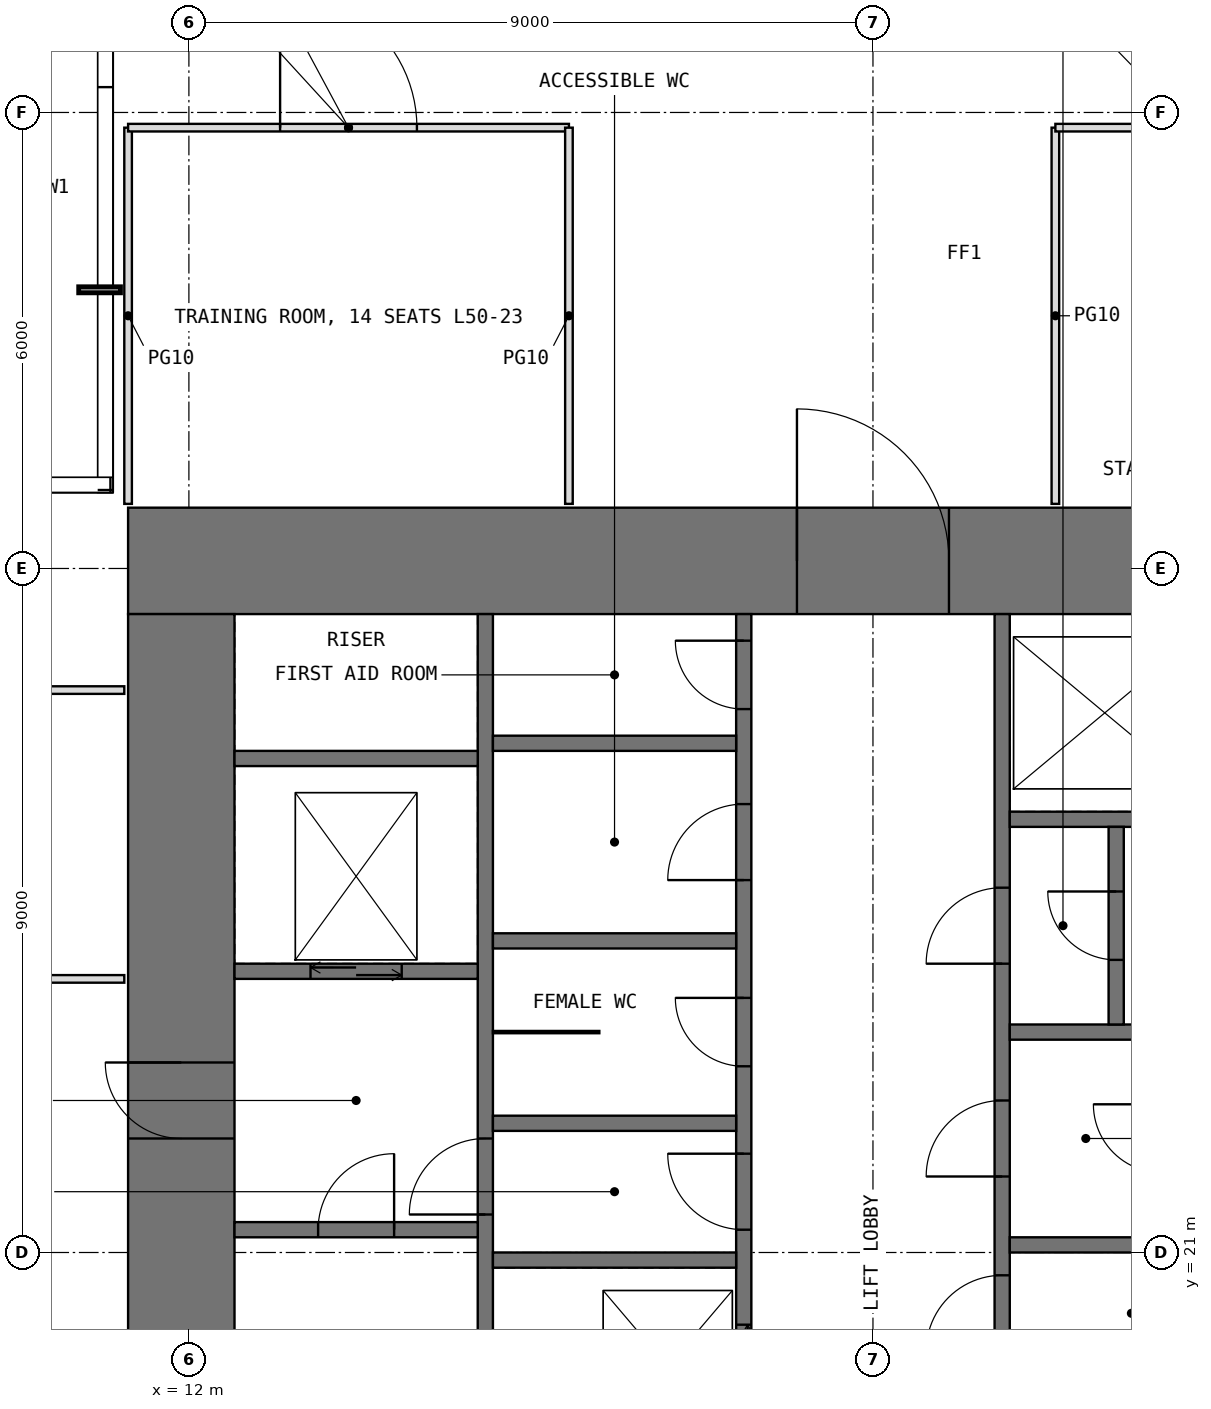
"""IFC4 building model, lengths in metres.
Left out: names, types, materials, properties, quantities, classifications, styles, units other than length and angle.
Written with IfcOpenShell. Run it as: python <this file> out.ifc"""

import sys

from ifc_helpers import new_model, si_unit, direction, frame, frame_2d, origin, place, context, subcontext, project, spatial, rectangle, extrude, element, fill, save


model = new_model("IFC4")
c1 = context("Model", 3, precision=1e-05, world=origin(), true_north=direction((0.0, 1.0)))
c2 = subcontext(c1, "Body", "Model", "MODEL_VIEW")
j1 = project(units=[si_unit("LENGTHUNIT", "METRE"), si_unit("PLANEANGLEUNIT", "RADIAN")], contexts=[c1])
p1 = place(None, origin())
s1 = spatial("IfcSite", under=j1, at=p1, CompositionType="ELEMENT")
p2 = place(p1, origin())
s2 = spatial("IfcBuilding", under=s1, at=p2, CompositionType="ELEMENT")
p3 = place(p2, frame((0.0, 0.0, 210.5)))
s3 = spatial("IfcBuildingStorey", under=s2, at=p3, CompositionType="ELEMENT", Elevation=210.5)
p4 = place(p3, frame((11.2, 30.1, -0.05), z_axis=(0.0, 0.0, 1.0), x_axis=(1.0, 0.0, 0.0)))
e1 = element("IfcWall", 1, at=p4, inside=s3, PredefinedType="SHEAR", context=c2, shape_type="SweptSolid", body=[
    extrude(rectangle(XDim=19.6, YDim=1.4, at=frame_2d((9.8, 0.0))), origin(), (0.0, 0.0, 1.0), 4.0),
])
p5 = place(p4, frame((8.8, 0.0, 0.05)))
e2 = element("IfcOpeningElement", 2, at=p5, cuts=e1, PredefinedType="OPENING", context=c2, shape_type="SweptSolid", body=[
    extrude(rectangle(XDim=2.0, YDim=2.2, at=frame_2d((1.0, 1.1))), frame((0.0, 0.71, 0.0), z_axis=(0.0, -1.0, 0.0), x_axis=(1.0, 0.0, 0.0)), (0.0, 0.0, 1.0), 1.42),
])
p6 = place(p3, frame((11.9, 12.6, -0.05), z_axis=(0.0, 0.0, 1.0), x_axis=(0.0, 1.0, 0.0)))
e3 = element("IfcWall", 3, at=p6, inside=s3, PredefinedType="SHEAR", context=c2, shape_type="SweptSolid", body=[
    extrude(rectangle(XDim=16.8, YDim=1.4, at=frame_2d((8.4, 0.0))), origin(), (0.0, 0.0, 1.0), 4.0),
])
p7 = place(p6, frame((9.9, 0.0, 0.05)))
e4 = element("IfcOpeningElement", 4, at=p7, cuts=e3, PredefinedType="OPENING", context=c2, shape_type="SweptSolid", body=[
    extrude(rectangle(XDim=1.0, YDim=2.2, at=frame_2d((0.5, 1.1))), frame((0.0, 0.71, 0.0), z_axis=(0.0, -1.0, 0.0), x_axis=(1.0, 0.0, 0.0)), (0.0, 0.0, 1.0), 1.42),
])
p8 = place(p3, frame((15.9, 12.6, -0.05), z_axis=(0.0, 0.0, 1.0), x_axis=(0.0, 1.0, 0.0)))
e5 = element("IfcWall", 5, at=p8, inside=s3, PredefinedType="SHEAR", context=c2, shape_type="SweptSolid", body=[
    extrude(rectangle(XDim=16.8, YDim=0.2, at=frame_2d((8.4, 0.0))), origin(), (0.0, 0.0, 1.0), 4.0),
])
p9 = place(p8, frame((8.9, 0.0, 0.05)))
e6 = element("IfcOpeningElement", 6, at=p9, cuts=e5, PredefinedType="OPENING", context=c2, shape_type="SweptSolid", body=[
    extrude(rectangle(XDim=1.0, YDim=2.2, at=frame_2d((0.5, 1.1))), frame((0.0, 0.11, 0.0), z_axis=(0.0, -1.0, 0.0), x_axis=(1.0, 0.0, 0.0)), (0.0, 0.0, 1.0), 0.22),
])
p10 = place(p3, frame((19.3, 12.6, -0.05), z_axis=(0.0, 0.0, 1.0), x_axis=(0.0, 1.0, 0.0)))
e7 = element("IfcWall", 7, at=p10, inside=s3, PredefinedType="SHEAR", context=c2, shape_type="SweptSolid", body=[
    extrude(rectangle(XDim=16.8, YDim=0.2, at=frame_2d((8.4, 0.0))), origin(), (0.0, 0.0, 1.0), 4.0),
])
p11 = place(p10, frame((8.7, 0.0, 0.05)))
e8 = element("IfcOpeningElement", 8, at=p11, cuts=e7, PredefinedType="OPENING", context=c2, shape_type="SweptSolid", body=[
    extrude(rectangle(XDim=1.0, YDim=2.2, at=frame_2d((0.5, 1.1))), frame((0.0, 0.11, 0.0), z_axis=(0.0, -1.0, 0.0), x_axis=(1.0, 0.0, 0.0)), (0.0, 0.0, 1.0), 0.22),
])
p12 = place(p10, frame((10.85, 0.0, 0.05)))
e9 = element("IfcOpeningElement", 9, at=p12, cuts=e7, PredefinedType="OPENING", context=c2, shape_type="SweptSolid", body=[
    extrude(rectangle(XDim=0.9, YDim=2.2, at=frame_2d((0.45, 1.1))), frame((0.0, 0.11, 0.0), z_axis=(0.0, -1.0, 0.0), x_axis=(1.0, 0.0, 0.0)), (0.0, 0.0, 1.0), 0.22),
])
p13 = place(p10, frame((13.3, 0.0, 0.05)))
e10 = element("IfcOpeningElement", 10, at=p13, cuts=e7, PredefinedType="OPENING", context=c2, shape_type="SweptSolid", body=[
    extrude(rectangle(XDim=1.0, YDim=2.2, at=frame_2d((0.5, 1.1))), frame((0.0, 0.11, 0.0), z_axis=(0.0, -1.0, 0.0), x_axis=(1.0, 0.0, 0.0)), (0.0, 0.0, 1.0), 0.22),
])
p14 = place(p10, frame((15.55, 0.0, 0.05)))
e11 = element("IfcOpeningElement", 11, at=p14, cuts=e7, PredefinedType="OPENING", context=c2, shape_type="SweptSolid", body=[
    extrude(rectangle(XDim=0.9, YDim=2.2, at=frame_2d((0.45, 1.1))), frame((0.0, 0.11, 0.0), z_axis=(0.0, -1.0, 0.0), x_axis=(1.0, 0.0, 0.0)), (0.0, 0.0, 1.0), 0.22),
])
p15 = place(p10, frame((0.75, 0.0, 0.05)))
e12 = element("IfcOpeningElement", 12, at=p15, cuts=e7, PredefinedType="OPENING", context=c2, shape_type="SweptSolid", body=[
    extrude(rectangle(XDim=1.1, YDim=2.2, at=frame_2d((0.55, 1.1))), frame((0.0, 0.11, 0.0), z_axis=(0.0, -1.0, 0.0), x_axis=(1.0, 0.0, 0.0)), (0.0, 0.0, 1.0), 0.22),
])
p16 = place(p10, frame((3.55, 0.0, 0.05)))
e13 = element("IfcOpeningElement", 13, at=p16, cuts=e7, PredefinedType="OPENING", context=c2, shape_type="SweptSolid", body=[
    extrude(rectangle(XDim=1.1, YDim=2.2, at=frame_2d((0.55, 1.1))), frame((0.0, 0.11, 0.0), z_axis=(0.0, -1.0, 0.0), x_axis=(1.0, 0.0, 0.0)), (0.0, 0.0, 1.0), 0.22),
])
p17 = place(p10, frame((6.35, 0.0, 0.05)))
e14 = element("IfcOpeningElement", 14, at=p17, cuts=e7, PredefinedType="OPENING", context=c2, shape_type="SweptSolid", body=[
    extrude(rectangle(XDim=1.1, YDim=2.2, at=frame_2d((0.55, 1.1))), frame((0.0, 0.11, 0.0), z_axis=(0.0, -1.0, 0.0), x_axis=(1.0, 0.0, 0.0)), (0.0, 0.0, 1.0), 0.22),
])
p18 = place(p3, frame((22.7, 12.6, -0.05), z_axis=(0.0, 0.0, 1.0), x_axis=(0.0, 1.0, 0.0)))
e15 = element("IfcWall", 15, at=p18, inside=s3, PredefinedType="SHEAR", context=c2, shape_type="SweptSolid", body=[
    extrude(rectangle(XDim=16.8, YDim=0.2, at=frame_2d((8.4, 0.0))), origin(), (0.0, 0.0, 1.0), 4.0),
])
p19 = place(p18, frame((0.45, 0.0, 0.05)))
e16 = element("IfcOpeningElement", 16, at=p19, cuts=e15, PredefinedType="OPENING", context=c2, shape_type="SweptSolid", body=[
    extrude(rectangle(XDim=0.9, YDim=2.2, at=frame_2d((0.45, 1.1))), frame((0.0, 0.11, 0.0), z_axis=(0.0, -1.0, 0.0), x_axis=(1.0, 0.0, 0.0)), (0.0, 0.0, 1.0), 0.22),
])
p20 = place(p18, frame((7.1, 0.0, 0.05)))
e17 = element("IfcOpeningElement", 17, at=p20, cuts=e15, PredefinedType="OPENING", context=c2, shape_type="SweptSolid", body=[
    extrude(rectangle(XDim=1.0, YDim=2.2, at=frame_2d((0.5, 1.1))), frame((0.0, 0.11, 0.0), z_axis=(0.0, -1.0, 0.0), x_axis=(1.0, 0.0, 0.0)), (0.0, 0.0, 1.0), 0.22),
])
p21 = place(p18, frame((1.95, 0.0, 0.05)))
e18 = element("IfcOpeningElement", 18, at=p21, cuts=e15, PredefinedType="OPENING", context=c2, shape_type="SweptSolid", body=[
    extrude(rectangle(XDim=0.9, YDim=2.2, at=frame_2d((0.45, 1.1))), frame((0.0, 0.11, 0.0), z_axis=(0.0, -1.0, 0.0), x_axis=(1.0, 0.0, 0.0)), (0.0, 0.0, 1.0), 0.22),
])
p22 = place(p18, frame((4.95, 0.0, 0.05)))
e19 = element("IfcOpeningElement", 19, at=p22, cuts=e15, PredefinedType="OPENING", context=c2, shape_type="SweptSolid", body=[
    extrude(rectangle(XDim=0.9, YDim=2.2, at=frame_2d((0.45, 1.1))), frame((0.0, 0.11, 0.0), z_axis=(0.0, -1.0, 0.0), x_axis=(1.0, 0.0, 0.0)), (0.0, 0.0, 1.0), 0.22),
])
p23 = place(p18, frame((9.4, 0.0, 0.05)))
e20 = element("IfcOpeningElement", 20, at=p23, cuts=e15, PredefinedType="OPENING", context=c2, shape_type="SweptSolid", body=[
    extrude(rectangle(XDim=1.0, YDim=2.2, at=frame_2d((0.5, 1.1))), frame((0.0, 0.11, 0.0), z_axis=(0.0, -1.0, 0.0), x_axis=(1.0, 0.0, 0.0)), (0.0, 0.0, 1.0), 0.22),
])
p24 = place(p18, frame((12.2, 0.0, 0.05)))
e21 = element("IfcOpeningElement", 21, at=p24, cuts=e15, PredefinedType="OPENING", context=c2, shape_type="SweptSolid", body=[
    extrude(rectangle(XDim=1.0, YDim=2.2, at=frame_2d((0.5, 1.1))), frame((0.0, 0.11, 0.0), z_axis=(0.0, -1.0, 0.0), x_axis=(1.0, 0.0, 0.0)), (0.0, 0.0, 1.0), 0.22),
])
p25 = place(p3, frame((12.6, 21.3, -0.05), z_axis=(0.0, 0.0, 1.0), x_axis=(1.0, 0.0, 0.0)))
e22 = element("IfcWall", 22, at=p25, inside=s3, PredefinedType="SHEAR", context=c2, shape_type="SweptSolid", body=[
    extrude(rectangle(XDim=3.2, YDim=0.2, at=frame_2d((1.6, 0.0))), origin(), (0.0, 0.0, 1.0), 4.0),
])
p26 = place(p25, frame((1.1, 0.0, 0.05)))
e23 = element("IfcOpeningElement", 23, at=p26, cuts=e22, PredefinedType="OPENING", context=c2, shape_type="SweptSolid", body=[
    extrude(rectangle(XDim=1.0, YDim=2.2, at=frame_2d((0.5, 1.1))), frame((0.0, 0.11, 0.0), z_axis=(0.0, -1.0, 0.0), x_axis=(1.0, 0.0, 0.0)), (0.0, 0.0, 1.0), 0.22),
])
p27 = place(p3, frame((12.6, 24.7, -0.05), z_axis=(0.0, 0.0, 1.0), x_axis=(1.0, 0.0, 0.0)))
e24 = element("IfcWall", 24, at=p27, inside=s3, PredefinedType="SHEAR", context=c2, shape_type="SweptSolid", body=[
    extrude(rectangle(XDim=3.2, YDim=0.2, at=frame_2d((1.6, 0.0))), origin(), (0.0, 0.0, 1.0), 4.0),
])
p28 = place(p27, frame((1.0, 0.0, 0.05)))
e25 = element("IfcOpeningElement", 25, at=p28, cuts=e24, PredefinedType="OPENING", context=c2, shape_type="SweptSolid", body=[
    extrude(rectangle(XDim=1.2, YDim=2.2, at=frame_2d((0.6, 1.1))), frame((0.0, 0.11, 0.0), z_axis=(0.0, -1.0, 0.0), x_axis=(1.0, 0.0, 0.0)), (0.0, 0.0, 1.0), 0.22),
])
for number, where, z_axis, x_axis in (
    (26, (12.6, 27.5, -0.05), (0.0, 0.0, 1.0), (1.0, 0.0, 0.0)),
    (27, (16.0, 20.9, -0.05), (0.0, 0.0, 1.0), (1.0, 0.0, 0.0)),
    (28, (16.0, 22.7, -0.05), (0.0, 0.0, 1.0), (1.0, 0.0, 0.0)),
    (29, (16.0, 25.1, -0.05), (0.0, 0.0, 1.0), (1.0, 0.0, 0.0)),
    (30, (16.0, 27.7, -0.05), (0.0, 0.0, 1.0), (1.0, 0.0, 0.0)),
    (31, (22.8, 21.1, -0.05), (0.0, 0.0, 1.0), (1.0, 0.0, 0.0)),
    (32, (22.8, 23.9, -0.05), (0.0, 0.0, 1.0), (1.0, 0.0, 0.0)),
    (33, (22.8, 26.7, -0.05), (0.0, 0.0, 1.0), (1.0, 0.0, 0.0)),
):
    element("IfcWall", number, at=place(p3, frame(where, z_axis=z_axis, x_axis=x_axis)), inside=s3, PredefinedType="SHEAR", context=c2, shape_type="SweptSolid", body=[
        extrude(rectangle(XDim=3.2, YDim=0.2, at=frame_2d((1.6, 0.0))), origin(), (0.0, 0.0, 1.0), 4.0),
    ])
p29 = place(p3, frame((16.0, 23.9, 0.0), z_axis=(0.0, 0.0, 1.0), x_axis=(1.0, 0.0, 0.0)))
e34 = element("IfcWall", 34, at=p29, inside=s3, PredefinedType="PARTITIONING", context=c2, shape_type="SweptSolid", body=[
    extrude(rectangle(XDim=1.4, YDim=0.03, at=frame_2d((0.7, 0.0))), origin(), (0.0, 0.0, 1.0), 3.75),
])
p30 = place(p3, frame((24.2, 24.0, -0.05), z_axis=(0.0, 0.0, 1.0), x_axis=(0.0, 1.0, 0.0)))
e35 = element("IfcWall", 35, at=p30, inside=s3, PredefinedType="SHEAR", context=c2, shape_type="SweptSolid", body=[
    extrude(rectangle(XDim=2.6, YDim=0.2, at=frame_2d((1.3, 0.0))), origin(), (0.0, 0.0, 1.0), 4.0),
])
p31 = place(p30, frame((0.85, 0.0, 0.05)))
e36 = element("IfcOpeningElement", 36, at=p31, cuts=e35, PredefinedType="OPENING", context=c2, shape_type="SweptSolid", body=[
    extrude(rectangle(XDim=0.9, YDim=2.2, at=frame_2d((0.45, 1.1))), frame((0.0, 0.11, 0.0), z_axis=(0.0, -1.0, 0.0), x_axis=(1.0, 0.0, 0.0)), (0.0, 0.0, 1.0), 0.22),
])
for number, where, z_axis, x_axis in (
    (37, (8.0, 24.6, 0.0), (0.0, 0.0, 1.0), (1.0, 0.0, 0.0)),
    (38, (8.0, 28.4, 0.0), (0.0, 0.0, 1.0), (1.0, 0.0, 0.0)),
):
    element("IfcWall", number, at=place(p3, frame(where, z_axis=z_axis, x_axis=x_axis)), inside=s3, PredefinedType="PARTITIONING", context=c2, shape_type="SweptSolid", body=[
        extrude(rectangle(XDim=3.15, YDim=0.1, at=frame_2d((1.575, 0.0))), origin(), (0.0, 0.0, 1.0), 3.75),
    ])
p32 = place(p3, frame((11.2, 30.85, 0.0), z_axis=(0.0, 0.0, 1.0), x_axis=(0.0, 1.0, 0.0)))
e39 = element("IfcWall", 39, at=p32, inside=s3, PredefinedType="PARTITIONING", context=c2, shape_type="SweptSolid", body=[
    extrude(rectangle(XDim=4.95, YDim=0.1, at=frame_2d((2.475, 0.0))), origin(), (0.0, 0.0, 1.0), 3.75),
])
p33 = place(p3, frame((11.2, 35.8, 0.0), z_axis=(0.0, 0.0, 1.0), x_axis=(1.0, 0.0, 0.0)))
e40 = element("IfcWall", 40, at=p33, inside=s3, PredefinedType="PARTITIONING", context=c2, shape_type="SweptSolid", body=[
    extrude(rectangle(XDim=5.8, YDim=0.1, at=frame_2d((2.9, 0.0))), origin(), (0.0, 0.0, 1.0), 3.75),
])
p34 = place(p33, frame((2.0, 0.0, 0.0)))
e41 = element("IfcOpeningElement", 41, at=p34, cuts=e40, PredefinedType="OPENING", context=c2, shape_type="SweptSolid", body=[
    extrude(rectangle(XDim=1.8, YDim=2.4, at=frame_2d((0.9, 1.2))), frame((0.0, 0.06, 0.0), z_axis=(0.0, -1.0, 0.0), x_axis=(1.0, 0.0, 0.0)), (0.0, 0.0, 1.0), 0.12),
])
for number, where, z_axis, x_axis in (
    (42, (17.0, 30.85, 0.0), (0.0, 0.0, 1.0), (0.0, 1.0, 0.0)),
    (43, (23.4, 30.85, 0.0), (0.0, 0.0, 1.0), (0.0, 1.0, 0.0)),
):
    element("IfcWall", number, at=place(p3, frame(where, z_axis=z_axis, x_axis=x_axis)), inside=s3, PredefinedType="PARTITIONING", context=c2, shape_type="SweptSolid", body=[
        extrude(rectangle(XDim=4.95, YDim=0.1, at=frame_2d((2.475, 0.0))), origin(), (0.0, 0.0, 1.0), 3.75),
    ])
p35 = place(p3, frame((23.4, 35.8, 0.0), z_axis=(0.0, 0.0, 1.0), x_axis=(1.0, 0.0, 0.0)))
e44 = element("IfcWall", 44, at=p35, inside=s3, PredefinedType="PARTITIONING", context=c2, shape_type="SweptSolid", body=[
    extrude(rectangle(XDim=3.6, YDim=0.1, at=frame_2d((1.8, 0.0))), origin(), (0.0, 0.0, 1.0), 3.75),
])
p36 = place(p35, frame((1.3, 0.0, 0.0)))
e45 = element("IfcOpeningElement", 45, at=p36, cuts=e44, PredefinedType="OPENING", context=c2, shape_type="SweptSolid", body=[
    extrude(rectangle(XDim=1.0, YDim=2.4, at=frame_2d((0.5, 1.2))), frame((0.0, 0.06, 0.0), z_axis=(0.0, -1.0, 0.0), x_axis=(1.0, 0.0, 0.0)), (0.0, 0.0, 1.0), 0.12),
])
p37 = place(p5, origin())
e46 = element("IfcDoor", 46, at=p37, inside=s3, OperationType="DOUBLE_DOOR_SINGLE_SWING", PredefinedType="DOOR", context=c2, shape_type="SweptSolid", body=[
    extrude(rectangle(XDim=2.0, YDim=2.2, at=frame_2d((1.0, 1.1))), frame((0.0, 0.025, 0.0), z_axis=(0.0, -1.0, 0.0), x_axis=(1.0, 0.0, 0.0)), (0.0, 0.0, 1.0), 0.05),
])
fill(e2, e46)
p38 = place(p7, origin())
e47 = element("IfcDoor", 47, at=p38, inside=s3, OperationType="SINGLE_SWING_RIGHT", PredefinedType="DOOR", context=c2, shape_type="SweptSolid", body=[
    extrude(rectangle(XDim=1.0, YDim=2.2, at=frame_2d((0.5, 1.1))), frame((0.0, 0.025, 0.0), z_axis=(0.0, -1.0, 0.0), x_axis=(1.0, 0.0, 0.0)), (0.0, 0.0, 1.0), 0.05),
])
fill(e4, e47)
p39 = place(p26, origin())
e48 = element("IfcDoor", 48, at=p39, inside=s3, OperationType="SINGLE_SWING_RIGHT", PredefinedType="DOOR", context=c2, shape_type="SweptSolid", body=[
    extrude(rectangle(XDim=1.0, YDim=2.2, at=frame_2d((0.5, 1.1))), frame((0.0, 0.025, 0.0), z_axis=(0.0, -1.0, 0.0), x_axis=(1.0, 0.0, 0.0)), (0.0, 0.0, 1.0), 0.05),
])
fill(e23, e48)
p40 = place(p9, origin())
e49 = element("IfcDoor", 49, at=p40, inside=s3, OperationType="SINGLE_SWING_LEFT", PredefinedType="DOOR", context=c2, shape_type="SweptSolid", body=[
    extrude(rectangle(XDim=1.0, YDim=2.2, at=frame_2d((0.5, 1.1))), frame((0.0, 0.025, 0.0), z_axis=(0.0, -1.0, 0.0), x_axis=(1.0, 0.0, 0.0)), (0.0, 0.0, 1.0), 0.05),
])
fill(e6, e49)
p41 = place(p11, origin())
e50 = element("IfcDoor", 50, at=p41, inside=s3, OperationType="SINGLE_SWING_RIGHT", PredefinedType="DOOR", context=c2, shape_type="SweptSolid", body=[
    extrude(rectangle(XDim=1.0, YDim=2.2, at=frame_2d((0.5, 1.1))), frame((0.0, 0.025, 0.0), z_axis=(0.0, -1.0, 0.0), x_axis=(1.0, 0.0, 0.0)), (0.0, 0.0, 1.0), 0.05),
])
fill(e8, e50)
p42 = place(p20, origin())
e51 = element("IfcDoor", 51, at=p42, inside=s3, OperationType="SINGLE_SWING_LEFT", PredefinedType="DOOR", context=c2, shape_type="SweptSolid", body=[
    extrude(rectangle(XDim=1.0, YDim=2.2, at=frame_2d((0.5, 1.1))), frame((0.0, 0.025, 0.0), z_axis=(0.0, -1.0, 0.0), x_axis=(1.0, 0.0, 0.0)), (0.0, 0.0, 1.0), 0.05),
])
fill(e17, e51)
p43 = place(p12, origin())
e52 = element("IfcDoor", 52, at=p43, inside=s3, OperationType="SINGLE_SWING_RIGHT", PredefinedType="DOOR", context=c2, shape_type="SweptSolid", body=[
    extrude(rectangle(XDim=0.9, YDim=2.2, at=frame_2d((0.45, 1.1))), frame((0.0, 0.025, 0.0), z_axis=(0.0, -1.0, 0.0), x_axis=(1.0, 0.0, 0.0)), (0.0, 0.0, 1.0), 0.05),
])
fill(e9, e52)
p44 = place(p13, origin())
e53 = element("IfcDoor", 53, at=p44, inside=s3, OperationType="SINGLE_SWING_LEFT", PredefinedType="DOOR", context=c2, shape_type="SweptSolid", body=[
    extrude(rectangle(XDim=1.0, YDim=2.2, at=frame_2d((0.5, 1.1))), frame((0.0, 0.025, 0.0), z_axis=(0.0, -1.0, 0.0), x_axis=(1.0, 0.0, 0.0)), (0.0, 0.0, 1.0), 0.05),
])
fill(e10, e53)
p45 = place(p14, origin())
e54 = element("IfcDoor", 54, at=p45, inside=s3, OperationType="SINGLE_SWING_RIGHT", PredefinedType="DOOR", context=c2, shape_type="SweptSolid", body=[
    extrude(rectangle(XDim=0.9, YDim=2.2, at=frame_2d((0.45, 1.1))), frame((0.0, 0.025, 0.0), z_axis=(0.0, -1.0, 0.0), x_axis=(1.0, 0.0, 0.0)), (0.0, 0.0, 1.0), 0.05),
])
fill(e11, e54)
p46 = place(p23, origin())
e55 = element("IfcDoor", 55, at=p46, inside=s3, OperationType="SINGLE_SWING_LEFT", PredefinedType="DOOR", context=c2, shape_type="SweptSolid", body=[
    extrude(rectangle(XDim=1.0, YDim=2.2, at=frame_2d((0.5, 1.1))), frame((0.0, 0.025, 0.0), z_axis=(0.0, -1.0, 0.0), x_axis=(1.0, 0.0, 0.0)), (0.0, 0.0, 1.0), 0.05),
])
fill(e20, e55)
p47 = place(p24, origin())
e56 = element("IfcDoor", 56, at=p47, inside=s3, OperationType="SINGLE_SWING_LEFT", PredefinedType="DOOR", context=c2, shape_type="SweptSolid", body=[
    extrude(rectangle(XDim=1.0, YDim=2.2, at=frame_2d((0.5, 1.1))), frame((0.0, 0.025, 0.0), z_axis=(0.0, -1.0, 0.0), x_axis=(1.0, 0.0, 0.0)), (0.0, 0.0, 1.0), 0.05),
])
fill(e21, e56)
p48 = place(p31, origin())
e57 = element("IfcDoor", 57, at=p48, inside=s3, OperationType="SINGLE_SWING_RIGHT", PredefinedType="DOOR", context=c2, shape_type="SweptSolid", body=[
    extrude(rectangle(XDim=0.9, YDim=2.2, at=frame_2d((0.45, 1.1))), frame((0.0, 0.025, 0.0), z_axis=(0.0, -1.0, 0.0), x_axis=(1.0, 0.0, 0.0)), (0.0, 0.0, 1.0), 0.05),
])
fill(e36, e57)
p49 = place(p34, origin())
e58 = element("IfcDoor", 58, at=p49, inside=s3, OperationType="DOUBLE_DOOR_SINGLE_SWING", PredefinedType="DOOR", context=c2, shape_type="SweptSolid", body=[
    extrude(rectangle(XDim=1.8, YDim=2.4, at=frame_2d((0.9, 1.2))), frame((0.0, 0.025, 0.0), z_axis=(0.0, -1.0, 0.0), x_axis=(1.0, 0.0, 0.0)), (0.0, 0.0, 1.0), 0.05),
])
fill(e41, e58)
p50 = place(p17, origin())
e59 = element("IfcDoor", 59, at=p50, inside=s3, OperationType="DOUBLE_DOOR_SLIDING", PredefinedType="DOOR", context=c2, shape_type="SweptSolid", body=[
    extrude(rectangle(XDim=1.1, YDim=2.2, at=frame_2d((0.55, 1.1))), frame((0.0, 0.025, 0.0), z_axis=(0.0, -1.0, 0.0), x_axis=(1.0, 0.0, 0.0)), (0.0, 0.0, 1.0), 0.05),
])
fill(e14, e59)
p51 = place(p28, origin())
e60 = element("IfcDoor", 60, at=p51, inside=s3, OperationType="DOUBLE_DOOR_SLIDING", PredefinedType="DOOR", context=c2, shape_type="SweptSolid", body=[
    extrude(rectangle(XDim=1.2, YDim=2.2, at=frame_2d((0.6, 1.1))), frame((0.0, 0.025, 0.0), z_axis=(0.0, -1.0, 0.0), x_axis=(1.0, 0.0, 0.0)), (0.0, 0.0, 1.0), 0.05),
])
fill(e25, e60)
save(model, sys.argv[1])
